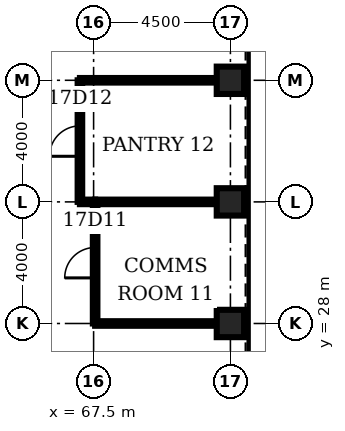
"""IFC4 building model, lengths in metres.
Left out: names, types, materials, properties, quantities, classifications, styles, units other than length and angle.
Written with IfcOpenShell. Run it as: python <this file> out.ifc"""

import sys

from ifc_helpers import new_model, si_unit, direction, frame, frame_2d, origin, origin_2d, place, context, subcontext, project, spatial, rectangle, hollow_rectangle, extrude, element, fill, save


model = new_model("IFC4")
c1 = context("Model", 3, precision=1e-05, world=origin(), true_north=direction((0.0, 1.0)))
c2 = subcontext(c1, "Body", "Model", "MODEL_VIEW")
j1 = project(units=[si_unit("LENGTHUNIT", "METRE"), si_unit("PLANEANGLEUNIT", "RADIAN")], contexts=[c1])
p1 = place(None, origin())
s1 = spatial("IfcSite", under=j1, at=p1, CompositionType="ELEMENT")
p2 = place(p1, origin())
s2 = spatial("IfcBuilding", under=s1, at=p2, CompositionType="ELEMENT")
p3 = place(p2, frame((0.0, 0.0, 81.5)))
s3 = spatial("IfcBuildingStorey", under=s2, at=p3, CompositionType="ELEMENT", Elevation=81.5)
for number, where, z_axis, x_axis in (
    (1, (72.0, 28.0, 0.0), (0.0, 0.0, 1.0), (1.0, 0.0, 0.0)),
    (2, (72.0, 32.0, 0.0), (0.0, 0.0, 1.0), (1.0, 0.0, 0.0)),
    (3, (72.0, 36.0, 0.0), (0.0, 0.0, 1.0), (1.0, 0.0, 0.0)),
):
    element("IfcColumn", number, at=place(p3, frame(where, z_axis=z_axis, x_axis=x_axis)), inside=s3, PredefinedType="COLUMN", context=c2, shape_type="SweptSolid", body=[
        extrude(hollow_rectangle(XDim=0.9, YDim=0.9, WallThickness=0.11, at=origin_2d()), origin(), (0.0, 0.0, 1.0), 4.5),
    ])
p4 = place(p3, frame((67.55, 28.0, 0.0), z_axis=(0.0, 0.0, 1.0), x_axis=(1.0, 0.0, 0.0)))
e4 = element("IfcWall", 4, at=p4, inside=s3, PredefinedType="PARTITIONING", context=c2, shape_type="SweptSolid", body=[
    extrude(rectangle(XDim=4.0, YDim=0.15, at=frame_2d((2.0, 0.0))), origin(), (0.0, 0.0, 1.0), 3.0),
])
p5 = place(p3, frame((67.05, 32.0, 0.0), z_axis=(0.0, 0.0, 1.0), x_axis=(1.0, 0.0, 0.0)))
e5 = element("IfcWall", 5, at=p5, inside=s3, PredefinedType="PARTITIONING", context=c2, shape_type="SweptSolid", body=[
    extrude(rectangle(XDim=0.5, YDim=0.15, at=frame_2d((0.25, 0.0))), origin(), (0.0, 0.0, 1.0), 3.0),
])
p6 = place(p3, frame((67.55, 32.0, 0.0), z_axis=(0.0, 0.0, 1.0), x_axis=(1.0, 0.0, 0.0)))
e6 = element("IfcWall", 6, at=p6, inside=s3, PredefinedType="PARTITIONING", context=c2, shape_type="SweptSolid", body=[
    extrude(rectangle(XDim=4.0, YDim=0.15, at=frame_2d((2.0, 0.0))), origin(), (0.0, 0.0, 1.0), 3.0),
])
p7 = place(p3, frame((67.05, 36.0, 0.0), z_axis=(0.0, 0.0, 1.0), x_axis=(1.0, 0.0, 0.0)))
e7 = element("IfcWall", 7, at=p7, inside=s3, PredefinedType="PARTITIONING", context=c2, shape_type="SweptSolid", body=[
    extrude(rectangle(XDim=4.5, YDim=0.15, at=frame_2d((2.25, 0.0))), origin(), (0.0, 0.0, 1.0), 3.0),
])
p8 = place(p3, frame((67.05, 32.0, 0.0), z_axis=(0.0, 0.0, 1.0), x_axis=(0.0, 1.0, 0.0)))
e8 = element("IfcWall", 8, at=p8, inside=s3, PredefinedType="PARTITIONING", context=c2, shape_type="SweptSolid", body=[
    extrude(rectangle(XDim=4.0, YDim=0.15, at=frame_2d((2.0, 0.0))), origin(), (0.0, 0.0, 1.0), 3.0),
])
p9 = place(p8, frame((1.5, 0.0, 0.0)))
e9 = element("IfcOpeningElement", 9, at=p9, cuts=e8, PredefinedType="OPENING", context=c2, shape_type="SweptSolid", body=[
    extrude(rectangle(XDim=1.0, YDim=2.1, at=frame_2d((0.5, 1.05))), frame((0.0, 0.085, 0.0), z_axis=(0.0, -1.0, 0.0), x_axis=(1.0, 0.0, 0.0)), (0.0, 0.0, 1.0), 0.17),
])
p10 = place(p3, frame((67.55, 28.0, 0.0), z_axis=(0.0, 0.0, 1.0), x_axis=(0.0, 1.0, 0.0)))
e10 = element("IfcWall", 10, at=p10, inside=s3, PredefinedType="PARTITIONING", context=c2, shape_type="SweptSolid", body=[
    extrude(rectangle(XDim=4.0, YDim=0.15, at=frame_2d((2.0, 0.0))), origin(), (0.0, 0.0, 1.0), 3.0),
])
p11 = place(p10, frame((1.5, 0.0, 0.0)))
e11 = element("IfcOpeningElement", 11, at=p11, cuts=e10, PredefinedType="OPENING", context=c2, shape_type="SweptSolid", body=[
    extrude(rectangle(XDim=1.0, YDim=2.1, at=frame_2d((0.5, 1.05))), frame((0.0, 0.085, 0.0), z_axis=(0.0, -1.0, 0.0), x_axis=(1.0, 0.0, 0.0)), (0.0, 0.0, 1.0), 0.17),
])
p12 = place(p11, origin())
e12 = element("IfcDoor", 12, at=p12, inside=s3, OperationType="SINGLE_SWING_LEFT", PredefinedType="DOOR", context=c2, shape_type="SweptSolid", body=[
    extrude(rectangle(XDim=1.0, YDim=2.1, at=frame_2d((0.5, 1.05))), frame((0.0, 0.025, 0.0), z_axis=(0.0, -1.0, 0.0), x_axis=(1.0, 0.0, 0.0)), (0.0, 0.0, 1.0), 0.05),
])
fill(e11, e12)
p13 = place(p9, origin())
e13 = element("IfcDoor", 13, at=p13, inside=s3, OperationType="SINGLE_SWING_LEFT", PredefinedType="DOOR", context=c2, shape_type="SweptSolid", body=[
    extrude(rectangle(XDim=1.0, YDim=2.1, at=frame_2d((0.5, 1.05))), frame((0.0, 0.025, 0.0), z_axis=(0.0, -1.0, 0.0), x_axis=(1.0, 0.0, 0.0)), (0.0, 0.0, 1.0), 0.05),
])
fill(e9, e13)
save(model, sys.argv[1])
